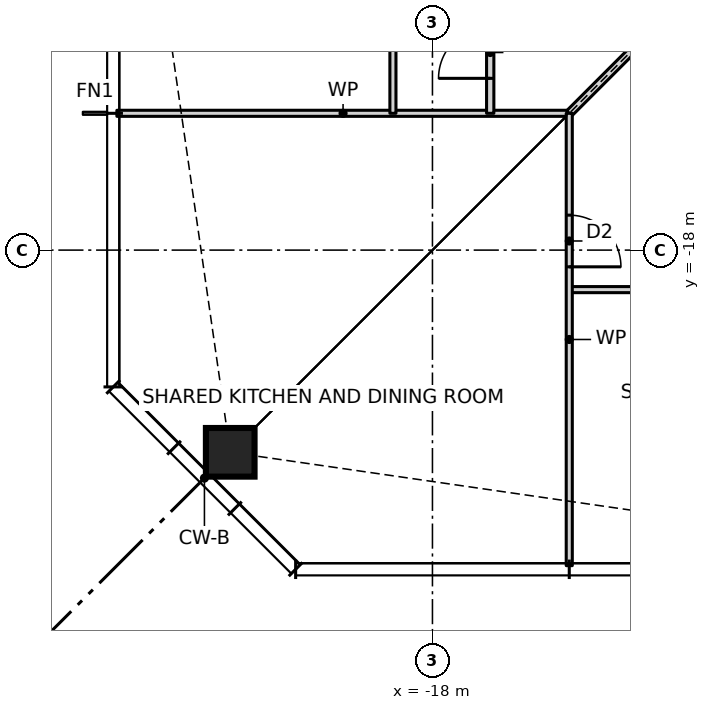
"""IFC4 building model, lengths in metres.
Left out: names, types, materials, properties, quantities, classifications, styles, units other than length and angle.
Written with IfcOpenShell. Run it as: python <this file> out.ifc"""

import sys

from ifc_helpers import new_model, si_unit, direction, frame, frame_2d, origin, origin_2d, place, context, subcontext, project, spatial, rectangle, hollow_rectangle, extrude, element, fill, save


model = new_model("IFC4")
c1 = context("Model", 3, precision=1e-05, world=origin(), true_north=direction((0.0, 1.0)))
c2 = subcontext(c1, "Body", "Model", "MODEL_VIEW")
j1 = project(units=[si_unit("LENGTHUNIT", "METRE"), si_unit("PLANEANGLEUNIT", "RADIAN")], contexts=[c1])
p1 = place(None, origin())
s1 = spatial("IfcSite", under=j1, at=p1, CompositionType="ELEMENT")
p2 = place(p1, origin())
s2 = spatial("IfcBuilding", under=s1, at=p2, CompositionType="ELEMENT")
p3 = place(p2, frame((0.0, 0.0, 32.5)))
s3 = spatial("IfcBuildingStorey", under=s2, at=p3, CompositionType="ELEMENT", Elevation=32.5)
p4 = place(p3, frame((-21.326, -21.326, 0.0), z_axis=(0.0, 0.0, 1.0), x_axis=(1.0, 0.0, 0.0)))
e1 = element("IfcColumn", 1, at=p4, inside=s3, PredefinedType="COLUMN", context=c2, shape_type="SweptSolid", body=[
    extrude(hollow_rectangle(XDim=0.8, YDim=0.8, WallThickness=0.09, at=origin_2d()), origin(), (0.0, 0.0, 1.0), 3.5),
])
p5 = place(p3, frame((-15.75, -18.65, 0.0), z_axis=(0.0, 0.0, 1.0), x_axis=(1.0, 0.0, 0.0)))
e2 = element("IfcWall", 2, at=p5, inside=s3, PredefinedType="PARTITIONING", context=c2, shape_type="SweptSolid", body=[
    extrude(rectangle(XDim=27.0, YDim=0.1, at=frame_2d((13.5, 0.0))), origin(), (0.0, 0.0, 1.0), 3.27),
])
p6 = place(p5, frame((1.8, 0.0, 0.0)))
e3 = element("IfcOpeningElement", 3, at=p6, cuts=e2, PredefinedType="OPENING", context=c2, shape_type="SweptSolid", body=[
    extrude(rectangle(XDim=0.9, YDim=2.1, at=frame_2d((0.45, 1.05))), frame((0.0, 0.06, 0.0), z_axis=(0.0, -1.0, 0.0), x_axis=(1.0, 0.0, 0.0)), (0.0, 0.0, 1.0), 0.12),
])
p7 = place(p5, frame((6.3, 0.0, 0.0)))
e4 = element("IfcOpeningElement", 4, at=p7, cuts=e2, PredefinedType="OPENING", context=c2, shape_type="SweptSolid", body=[
    extrude(rectangle(XDim=0.9, YDim=2.1, at=frame_2d((0.45, 1.05))), frame((0.0, 0.06, 0.0), z_axis=(0.0, -1.0, 0.0), x_axis=(1.0, 0.0, 0.0)), (0.0, 0.0, 1.0), 0.12),
])
p8 = place(p5, frame((10.8, 0.0, 0.0)))
e5 = element("IfcOpeningElement", 5, at=p8, cuts=e2, PredefinedType="OPENING", context=c2, shape_type="SweptSolid", body=[
    extrude(rectangle(XDim=0.9, YDim=2.1, at=frame_2d((0.45, 1.05))), frame((0.0, 0.06, 0.0), z_axis=(0.0, -1.0, 0.0), x_axis=(1.0, 0.0, 0.0)), (0.0, 0.0, 1.0), 0.12),
])
p9 = place(p5, frame((15.3, 0.0, 0.0)))
e6 = element("IfcOpeningElement", 6, at=p9, cuts=e2, PredefinedType="OPENING", context=c2, shape_type="SweptSolid", body=[
    extrude(rectangle(XDim=0.9, YDim=2.1, at=frame_2d((0.45, 1.05))), frame((0.0, 0.06, 0.0), z_axis=(0.0, -1.0, 0.0), x_axis=(1.0, 0.0, 0.0)), (0.0, 0.0, 1.0), 0.12),
])
p10 = place(p5, frame((19.8, 0.0, 0.0)))
e7 = element("IfcOpeningElement", 7, at=p10, cuts=e2, PredefinedType="OPENING", context=c2, shape_type="SweptSolid", body=[
    extrude(rectangle(XDim=0.9, YDim=2.1, at=frame_2d((0.45, 1.05))), frame((0.0, 0.06, 0.0), z_axis=(0.0, -1.0, 0.0), x_axis=(1.0, 0.0, 0.0)), (0.0, 0.0, 1.0), 0.12),
])
p11 = place(p5, frame((24.3, 0.0, 0.0)))
e8 = element("IfcOpeningElement", 8, at=p11, cuts=e2, PredefinedType="OPENING", context=c2, shape_type="SweptSolid", body=[
    extrude(rectangle(XDim=0.9, YDim=2.1, at=frame_2d((0.45, 1.05))), frame((0.0, 0.06, 0.0), z_axis=(0.0, -1.0, 0.0), x_axis=(1.0, 0.0, 0.0)), (0.0, 0.0, 1.0), 0.12),
])
p12 = place(p3, frame((-23.19, -15.75, 0.0), z_axis=(0.0, 0.0, 1.0), x_axis=(1.0, 0.0, 0.0)))
e9 = element("IfcWall", 9, at=p12, inside=s3, PredefinedType="PARTITIONING", context=c2, shape_type="SweptSolid", body=[
    extrude(rectangle(XDim=7.44, YDim=0.1, at=frame_2d((3.72, 0.0))), origin(), (0.0, 0.0, 1.0), 3.27),
])
p13 = place(p3, frame((-15.75, -15.75, 0.0), z_axis=(0.0, 0.0, 1.0), x_axis=(0.707106781187, 0.707106781187, 0.0)))
e10 = element("IfcWall", 10, at=p13, inside=s3, PredefinedType="PARTITIONING", context=c2, shape_type="SweptSolid", body=[
    extrude(rectangle(XDim=5.869, YDim=0.12, at=frame_2d((2.935, 0.0))), origin(), (0.0, 0.0, 1.0), 2.343),
])
p14 = place(p3, frame((-15.75, -23.19, 0.0), z_axis=(0.0, 0.0, 1.0), x_axis=(0.0, 1.0, 0.0)))
e11 = element("IfcWall", 11, at=p14, inside=s3, PredefinedType="PARTITIONING", context=c2, shape_type="SweptSolid", body=[
    extrude(rectangle(XDim=7.44, YDim=0.1, at=frame_2d((3.72, 0.0))), origin(), (0.0, 0.0, 1.0), 3.27),
])
p15 = place(p14, frame((4.915, 0.0, 0.0)))
e12 = element("IfcOpeningElement", 12, at=p15, cuts=e11, PredefinedType="OPENING", context=c2, shape_type="SweptSolid", body=[
    extrude(rectangle(XDim=0.85, YDim=2.1, at=frame_2d((0.425, 1.05))), frame((0.0, 0.06, 0.0), z_axis=(0.0, -1.0, 0.0), x_axis=(1.0, 0.0, 0.0)), (0.0, 0.0, 1.0), 0.12),
])
p16 = place(p3, frame((-17.05, -15.75, 0.0), z_axis=(0.0, 0.0, 1.0), x_axis=(0.0, 1.0, 0.0)))
e13 = element("IfcWall", 13, at=p16, inside=s3, PredefinedType="PARTITIONING", context=c2, shape_type="SweptSolid", body=[
    extrude(rectangle(XDim=5.1, YDim=0.12, at=frame_2d((2.55, 0.0))), origin(), (0.0, 0.0, 1.0), 3.27),
])
p17 = place(p16, frame((2.375, 0.0, 0.0)))
e14 = element("IfcOpeningElement", 14, at=p17, cuts=e13, PredefinedType="OPENING", context=c2, shape_type="SweptSolid", body=[
    extrude(rectangle(XDim=0.85, YDim=2.1, at=frame_2d((0.425, 1.05))), frame((0.0, 0.07, 0.0), z_axis=(0.0, -1.0, 0.0), x_axis=(1.0, 0.0, 0.0)), (0.0, 0.0, 1.0), 0.14),
])
p18 = place(p16, frame((0.575, 0.0, 0.0)))
e15 = element("IfcOpeningElement", 15, at=p18, cuts=e13, PredefinedType="OPENING", context=c2, shape_type="SweptSolid", body=[
    extrude(rectangle(XDim=0.85, YDim=2.1, at=frame_2d((0.425, 1.05))), frame((0.0, 0.07, 0.0), z_axis=(0.0, -1.0, 0.0), x_axis=(1.0, 0.0, 0.0)), (0.0, 0.0, 1.0), 0.14),
])
p19 = place(p3, frame((-18.65, -15.75, 0.0), z_axis=(0.0, 0.0, 1.0), x_axis=(0.0, 1.0, 0.0)))
e16 = element("IfcWall", 16, at=p19, inside=s3, PredefinedType="PARTITIONING", context=c2, shape_type="SweptSolid", body=[
    extrude(rectangle(XDim=31.5, YDim=0.1, at=frame_2d((15.75, 0.0))), origin(), (0.0, 0.0, 1.0), 3.27),
])
p20 = place(p19, frame((28.8, 0.0, 0.0)))
e17 = element("IfcOpeningElement", 17, at=p20, cuts=e16, PredefinedType="OPENING", context=c2, shape_type="SweptSolid", body=[
    extrude(rectangle(XDim=0.9, YDim=2.1, at=frame_2d((0.45, 1.05))), frame((0.0, 0.06, 0.0), z_axis=(0.0, -1.0, 0.0), x_axis=(1.0, 0.0, 0.0)), (0.0, 0.0, 1.0), 0.12),
])
p21 = place(p19, frame((24.3, 0.0, 0.0)))
e18 = element("IfcOpeningElement", 18, at=p21, cuts=e16, PredefinedType="OPENING", context=c2, shape_type="SweptSolid", body=[
    extrude(rectangle(XDim=0.9, YDim=2.1, at=frame_2d((0.45, 1.05))), frame((0.0, 0.06, 0.0), z_axis=(0.0, -1.0, 0.0), x_axis=(1.0, 0.0, 0.0)), (0.0, 0.0, 1.0), 0.12),
])
p22 = place(p19, frame((19.8, 0.0, 0.0)))
e19 = element("IfcOpeningElement", 19, at=p22, cuts=e16, PredefinedType="OPENING", context=c2, shape_type="SweptSolid", body=[
    extrude(rectangle(XDim=0.9, YDim=2.1, at=frame_2d((0.45, 1.05))), frame((0.0, 0.06, 0.0), z_axis=(0.0, -1.0, 0.0), x_axis=(1.0, 0.0, 0.0)), (0.0, 0.0, 1.0), 0.12),
])
p23 = place(p19, frame((15.3, 0.0, 0.0)))
e20 = element("IfcOpeningElement", 20, at=p23, cuts=e16, PredefinedType="OPENING", context=c2, shape_type="SweptSolid", body=[
    extrude(rectangle(XDim=0.9, YDim=2.1, at=frame_2d((0.45, 1.05))), frame((0.0, 0.06, 0.0), z_axis=(0.0, -1.0, 0.0), x_axis=(1.0, 0.0, 0.0)), (0.0, 0.0, 1.0), 0.12),
])
p24 = place(p19, frame((10.8, 0.0, 0.0)))
e21 = element("IfcOpeningElement", 21, at=p24, cuts=e16, PredefinedType="OPENING", context=c2, shape_type="SweptSolid", body=[
    extrude(rectangle(XDim=0.9, YDim=2.1, at=frame_2d((0.45, 1.05))), frame((0.0, 0.06, 0.0), z_axis=(0.0, -1.0, 0.0), x_axis=(1.0, 0.0, 0.0)), (0.0, 0.0, 1.0), 0.12),
])
p25 = place(p19, frame((6.3, 0.0, 0.0)))
e22 = element("IfcOpeningElement", 22, at=p25, cuts=e16, PredefinedType="OPENING", context=c2, shape_type="SweptSolid", body=[
    extrude(rectangle(XDim=0.9, YDim=2.1, at=frame_2d((0.45, 1.05))), frame((0.0, 0.06, 0.0), z_axis=(0.0, -1.0, 0.0), x_axis=(1.0, 0.0, 0.0)), (0.0, 0.0, 1.0), 0.12),
])
p26 = place(p19, frame((1.8, 0.0, 0.0)))
e23 = element("IfcOpeningElement", 23, at=p26, cuts=e16, PredefinedType="OPENING", context=c2, shape_type="SweptSolid", body=[
    extrude(rectangle(XDim=0.9, YDim=2.1, at=frame_2d((0.45, 1.05))), frame((0.0, 0.06, 0.0), z_axis=(0.0, -1.0, 0.0), x_axis=(1.0, 0.0, 0.0)), (0.0, 0.0, 1.0), 0.12),
])
p27 = place(p18, origin())
e24 = element("IfcDoor", 24, at=p27, inside=s3, OperationType="SINGLE_SWING_LEFT", PredefinedType="DOOR", context=c2, shape_type="SweptSolid", body=[
    extrude(rectangle(XDim=0.85, YDim=2.1, at=frame_2d((0.425, 1.05))), frame((0.0, 0.025, 0.0), z_axis=(0.0, -1.0, 0.0), x_axis=(1.0, 0.0, 0.0)), (0.0, 0.0, 1.0), 0.05),
])
fill(e15, e24)
p28 = place(p15, frame((0.85, 0.0, 0.0), z_axis=(0.0, 0.0, 1.0), x_axis=(-1.0, 0.0, 0.0)))
e25 = element("IfcDoor", 25, at=p28, inside=s3, OperationType="SINGLE_SWING_RIGHT", PredefinedType="DOOR", context=c2, shape_type="SweptSolid", body=[
    extrude(rectangle(XDim=0.85, YDim=2.1, at=frame_2d((0.425, 1.05))), frame((0.0, 0.025, 0.0), z_axis=(0.0, -1.0, 0.0), x_axis=(1.0, 0.0, 0.0)), (0.0, 0.0, 1.0), 0.05),
])
fill(e12, e25)
save(model, sys.argv[1])
